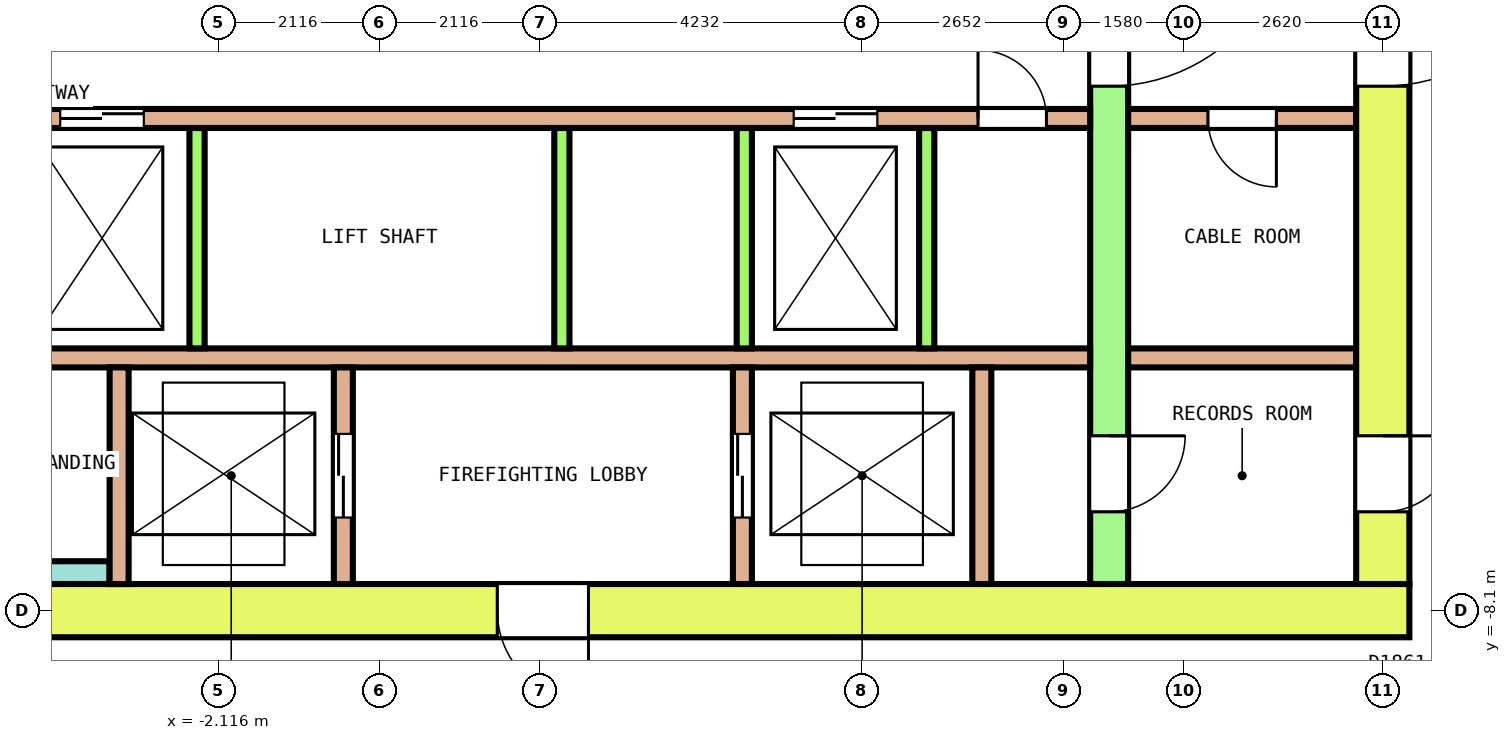
"""IFC4 building model, lengths in metres.
Left out: names, types, materials, properties, quantities, classifications, styles, units other than length and angle.
Written with IfcOpenShell. Run it as: python <this file> out.ifc"""

import sys

from ifc_helpers import new_model, si_unit, direction, frame, frame_2d, origin, place, context, subcontext, project, spatial, rectangle, extrude, element, fill, save


model = new_model("IFC4")
c1 = context("Model", 3, precision=1e-05, world=origin(), true_north=direction((0.0, 1.0)))
c2 = subcontext(c1, "Body", "Model", "MODEL_VIEW")
j1 = project(units=[si_unit("LENGTHUNIT", "METRE"), si_unit("PLANEANGLEUNIT", "RADIAN")], contexts=[c1])
p1 = place(None, origin())
s1 = spatial("IfcSite", under=j1, at=p1, CompositionType="ELEMENT")
p2 = place(p1, origin())
s2 = spatial("IfcBuilding", under=s1, at=p2, CompositionType="ELEMENT")
p3 = place(p2, frame((0.0, 0.0, 180.4)))
s3 = spatial("IfcBuildingStorey", under=s2, at=p3, CompositionType="ELEMENT", Elevation=180.4)
p4 = place(p3, frame((-13.55, -8.1, 0.0), z_axis=(0.0, 0.0, 1.0), x_axis=(1.0, 0.0, 0.0)))
e1 = element("IfcWall", 1, at=p4, inside=s3, PredefinedType="SHEAR", context=c2, shape_type="SweptSolid", body=[
    extrude(rectangle(XDim=27.1, YDim=0.7, at=frame_2d((13.55, 0.0))), origin(), (0.0, 0.0, 1.0), 4.1),
])
p5 = place(p4, frame((15.1, 0.0, 0.0)))
e2 = element("IfcOpeningElement", 2, at=p5, cuts=e1, PredefinedType="OPENING", context=c2, shape_type="SweptSolid", body=[
    extrude(rectangle(XDim=1.2, YDim=2.1, at=frame_2d((0.6, 1.05))), frame((0.0, 0.36, 0.0), z_axis=(0.0, -1.0, 0.0), x_axis=(1.0, 0.0, 0.0)), (0.0, 0.0, 1.0), 0.72),
])
p6 = place(p3, frame((13.2, -7.75, 0.0), z_axis=(0.0, 0.0, 1.0), x_axis=(0.0, 1.0, 0.0)))
e3 = element("IfcWall", 3, at=p6, inside=s3, PredefinedType="SHEAR", context=c2, shape_type="SweptSolid", body=[
    extrude(rectangle(XDim=15.5, YDim=0.7, at=frame_2d((7.75, 0.0))), origin(), (0.0, 0.0, 1.0), 4.1),
])
p7 = place(p6, frame((6.55, 0.0, 0.0)))
e4 = element("IfcOpeningElement", 4, at=p7, cuts=e3, PredefinedType="OPENING", context=c2, shape_type="SweptSolid", body=[
    extrude(rectangle(XDim=2.4, YDim=2.1, at=frame_2d((1.2, 1.05))), frame((0.0, 0.36, 0.0), z_axis=(0.0, -1.0, 0.0), x_axis=(1.0, 0.0, 0.0)), (0.0, 0.0, 1.0), 0.72),
])
p8 = place(p6, frame((13.45, 0.0, 0.0)))
e5 = element("IfcOpeningElement", 5, at=p8, cuts=e3, PredefinedType="OPENING", context=c2, shape_type="SweptSolid", body=[
    extrude(rectangle(XDim=1.2, YDim=2.1, at=frame_2d((0.6, 1.05))), frame((0.0, 0.36, 0.0), z_axis=(0.0, -1.0, 0.0), x_axis=(1.0, 0.0, 0.0)), (0.0, 0.0, 1.0), 0.72),
])
p9 = place(p6, frame((0.95, 0.0, 0.0)))
e6 = element("IfcOpeningElement", 6, at=p9, cuts=e3, PredefinedType="OPENING", context=c2, shape_type="SweptSolid", body=[
    extrude(rectangle(XDim=1.0, YDim=2.1, at=frame_2d((0.5, 1.05))), frame((0.0, 0.36, 0.0), z_axis=(0.0, -1.0, 0.0), x_axis=(1.0, 0.0, 0.0)), (0.0, 0.0, 1.0), 0.72),
])
p10 = place(p3, frame((9.6, -7.75, 0.0), z_axis=(0.0, 0.0, 1.0), x_axis=(0.0, 1.0, 0.0)))
e7 = element("IfcWall", 7, at=p10, inside=s3, PredefinedType="SHEAR", context=c2, shape_type="SweptSolid", body=[
    extrude(rectangle(XDim=15.5, YDim=0.5, at=frame_2d((7.75, 0.0))), origin(), (0.0, 0.0, 1.0), 4.1),
])
p11 = place(p10, frame((6.55, 0.0, 0.0)))
e8 = element("IfcOpeningElement", 8, at=p11, cuts=e7, PredefinedType="OPENING", context=c2, shape_type="SweptSolid", body=[
    extrude(rectangle(XDim=2.4, YDim=2.1, at=frame_2d((1.2, 1.05))), frame((0.0, 0.26, 0.0), z_axis=(0.0, -1.0, 0.0), x_axis=(1.0, 0.0, 0.0)), (0.0, 0.0, 1.0), 0.52),
])
p12 = place(p10, frame((13.45, 0.0, 0.0)))
e9 = element("IfcOpeningElement", 9, at=p12, cuts=e7, PredefinedType="OPENING", context=c2, shape_type="SweptSolid", body=[
    extrude(rectangle(XDim=1.2, YDim=2.1, at=frame_2d((0.6, 1.05))), frame((0.0, 0.26, 0.0), z_axis=(0.0, -1.0, 0.0), x_axis=(1.0, 0.0, 0.0)), (0.0, 0.0, 1.0), 0.52),
])
p13 = place(p10, frame((0.95, 0.0, 0.0)))
e10 = element("IfcOpeningElement", 10, at=p13, cuts=e7, PredefinedType="OPENING", context=c2, shape_type="SweptSolid", body=[
    extrude(rectangle(XDim=1.0, YDim=2.1, at=frame_2d((0.5, 1.05))), frame((0.0, 0.26, 0.0), z_axis=(0.0, -1.0, 0.0), x_axis=(1.0, 0.0, 0.0)), (0.0, 0.0, 1.0), 0.52),
])
p14 = place(p3, frame((-9.35, -1.625, 0.0), z_axis=(0.0, 0.0, 1.0), x_axis=(1.0, 0.0, 0.0)))
e11 = element("IfcWall", 11, at=p14, inside=s3, PredefinedType="SOLIDWALL", context=c2, shape_type="SweptSolid", body=[
    extrude(rectangle(XDim=18.7, YDim=0.25, at=frame_2d((9.35, 0.0))), origin(), (0.0, 0.0, 1.0), 4.1),
])
p15 = place(p14, frame((2.85, 0.0, 0.0)))
e12 = element("IfcOpeningElement", 12, at=p15, cuts=e11, PredefinedType="OPENING", context=c2, shape_type="SweptSolid", body=[
    extrude(rectangle(XDim=1.1, YDim=2.1, at=frame_2d((0.55, 1.05))), frame((0.0, 0.135, 0.0), z_axis=(0.0, -1.0, 0.0), x_axis=(1.0, 0.0, 0.0)), (0.0, 0.0, 1.0), 0.27),
])
p16 = place(p14, frame((5.15, 0.0, 0.0)))
e13 = element("IfcOpeningElement", 13, at=p16, cuts=e11, PredefinedType="OPENING", context=c2, shape_type="SweptSolid", body=[
    extrude(rectangle(XDim=1.1, YDim=2.1, at=frame_2d((0.55, 1.05))), frame((0.0, 0.135, 0.0), z_axis=(0.0, -1.0, 0.0), x_axis=(1.0, 0.0, 0.0)), (0.0, 0.0, 1.0), 0.27),
])
p17 = place(p14, frame((14.8, 0.0, 0.0)))
e14 = element("IfcOpeningElement", 14, at=p17, cuts=e11, PredefinedType="OPENING", context=c2, shape_type="SweptSolid", body=[
    extrude(rectangle(XDim=1.1, YDim=2.1, at=frame_2d((0.55, 1.05))), frame((0.0, 0.135, 0.0), z_axis=(0.0, -1.0, 0.0), x_axis=(1.0, 0.0, 0.0)), (0.0, 0.0, 1.0), 0.27),
])
p18 = place(p14, frame((0.575, 0.0, 0.0)))
e15 = element("IfcOpeningElement", 15, at=p18, cuts=e11, PredefinedType="OPENING", context=c2, shape_type="SweptSolid", body=[
    extrude(rectangle(XDim=0.9, YDim=2.1, at=frame_2d((0.45, 1.05))), frame((0.0, 0.135, 0.0), z_axis=(0.0, -1.0, 0.0), x_axis=(1.0, 0.0, 0.0)), (0.0, 0.0, 1.0), 0.27),
])
p19 = place(p14, frame((17.225, 0.0, 0.0)))
e16 = element("IfcOpeningElement", 16, at=p19, cuts=e11, PredefinedType="OPENING", context=c2, shape_type="SweptSolid", body=[
    extrude(rectangle(XDim=0.9, YDim=2.1, at=frame_2d((0.45, 1.05))), frame((0.0, 0.135, 0.0), z_axis=(0.0, -1.0, 0.0), x_axis=(1.0, 0.0, 0.0)), (0.0, 0.0, 1.0), 0.27),
])
p20 = place(p3, frame((9.85, -1.625, 0.0), z_axis=(0.0, 0.0, 1.0), x_axis=(1.0, 0.0, 0.0)))
e17 = element("IfcWall", 17, at=p20, inside=s3, PredefinedType="SOLIDWALL", context=c2, shape_type="SweptSolid", body=[
    extrude(rectangle(XDim=3.0, YDim=0.25, at=frame_2d((1.5, 0.0))), origin(), (0.0, 0.0, 1.0), 4.1),
])
p21 = place(p20, frame((1.05, 0.0, 0.0)))
e18 = element("IfcOpeningElement", 18, at=p21, cuts=e17, PredefinedType="OPENING", context=c2, shape_type="SweptSolid", body=[
    extrude(rectangle(XDim=0.9, YDim=2.1, at=frame_2d((0.45, 1.05))), frame((0.0, 0.135, 0.0), z_axis=(0.0, -1.0, 0.0), x_axis=(1.0, 0.0, 0.0)), (0.0, 0.0, 1.0), 0.27),
])
p22 = place(p3, frame((-9.35, -4.775, 0.0), z_axis=(0.0, 0.0, 1.0), x_axis=(1.0, 0.0, 0.0)))
e19 = element("IfcWall", 19, at=p22, inside=s3, PredefinedType="SOLIDWALL", context=c2, shape_type="SweptSolid", body=[
    extrude(rectangle(XDim=18.7, YDim=0.25, at=frame_2d((9.35, 0.0))), origin(), (0.0, 0.0, 1.0), 4.1),
])
p23 = place(p3, frame((9.85, -4.775, 0.0), z_axis=(0.0, 0.0, 1.0), x_axis=(1.0, 0.0, 0.0)))
e20 = element("IfcWall", 20, at=p23, inside=s3, PredefinedType="SOLIDWALL", context=c2, shape_type="SweptSolid", body=[
    extrude(rectangle(XDim=3.0, YDim=0.25, at=frame_2d((1.5, 0.0))), origin(), (0.0, 0.0, 1.0), 4.1),
])
for number, where, z_axis, x_axis in (
    (21, (-2.4, -4.65, 0.0), (0.0, 0.0, 1.0), (0.0, 1.0, 0.0)),
    (22, (2.4, -4.65, 0.0), (0.0, 0.0, 1.0), (0.0, 1.0, 0.0)),
    (23, (4.8, -4.65, 0.0), (0.0, 0.0, 1.0), (0.0, 1.0, 0.0)),
    (24, (7.2, -4.65, 0.0), (0.0, 0.0, 1.0), (0.0, 1.0, 0.0)),
):
    element("IfcWall", number, at=place(p3, frame(where, z_axis=z_axis, x_axis=x_axis)), inside=s3, PredefinedType="SOLIDWALL", context=c2, shape_type="SweptSolid", body=[
        extrude(rectangle(XDim=2.9, YDim=0.2, at=frame_2d((1.45, 0.0))), origin(), (0.0, 0.0, 1.0), 4.1),
    ])
p24 = place(p3, frame((-9.35, -7.6, 0.0), z_axis=(0.0, 0.0, 1.0), x_axis=(1.0, 0.0, 0.0)))
e25 = element("IfcWall", 25, at=p24, inside=s3, PredefinedType="SOLIDWALL", context=c2, shape_type="SweptSolid", body=[
    extrude(rectangle(XDim=5.8, YDim=0.3, at=frame_2d((2.9, 0.0))), origin(), (0.0, 0.0, 1.0), 4.1),
])
p25 = place(p3, frame((-3.425, -7.75, 0.0), z_axis=(0.0, 0.0, 1.0), x_axis=(0.0, 1.0, 0.0)))
e26 = element("IfcWall", 26, at=p25, inside=s3, PredefinedType="SOLIDWALL", context=c2, shape_type="SweptSolid", body=[
    extrude(rectangle(XDim=2.85, YDim=0.25, at=frame_2d((1.425, 0.0))), origin(), (0.0, 0.0, 1.0), 4.1),
])
p26 = place(p3, frame((-0.475, -7.75, 0.0), z_axis=(0.0, 0.0, 1.0), x_axis=(0.0, 1.0, 0.0)))
e27 = element("IfcWall", 27, at=p26, inside=s3, PredefinedType="SOLIDWALL", context=c2, shape_type="SweptSolid", body=[
    extrude(rectangle(XDim=2.85, YDim=0.25, at=frame_2d((1.425, 0.0))), origin(), (0.0, 0.0, 1.0), 4.1),
])
p27 = place(p26, frame((0.875, 0.0, 0.0)))
e28 = element("IfcOpeningElement", 28, at=p27, cuts=e27, PredefinedType="OPENING", context=c2, shape_type="SweptSolid", body=[
    extrude(rectangle(XDim=1.1, YDim=2.1, at=frame_2d((0.55, 1.05))), frame((0.0, 0.135, 0.0), z_axis=(0.0, -1.0, 0.0), x_axis=(1.0, 0.0, 0.0)), (0.0, 0.0, 1.0), 0.27),
])
p28 = place(p3, frame((4.775, -7.75, 0.0), z_axis=(0.0, 0.0, 1.0), x_axis=(0.0, 1.0, 0.0)))
e29 = element("IfcWall", 29, at=p28, inside=s3, PredefinedType="SOLIDWALL", context=c2, shape_type="SweptSolid", body=[
    extrude(rectangle(XDim=2.85, YDim=0.25, at=frame_2d((1.425, 0.0))), origin(), (0.0, 0.0, 1.0), 4.1),
])
p29 = place(p28, frame((0.875, 0.0, 0.0)))
e30 = element("IfcOpeningElement", 30, at=p29, cuts=e29, PredefinedType="OPENING", context=c2, shape_type="SweptSolid", body=[
    extrude(rectangle(XDim=1.1, YDim=2.1, at=frame_2d((0.55, 1.05))), frame((0.0, 0.135, 0.0), z_axis=(0.0, -1.0, 0.0), x_axis=(1.0, 0.0, 0.0)), (0.0, 0.0, 1.0), 0.27),
])
p30 = place(p3, frame((7.925, -7.75, 0.0), z_axis=(0.0, 0.0, 1.0), x_axis=(0.0, 1.0, 0.0)))
e31 = element("IfcWall", 31, at=p30, inside=s3, PredefinedType="SOLIDWALL", context=c2, shape_type="SweptSolid", body=[
    extrude(rectangle(XDim=2.85, YDim=0.25, at=frame_2d((1.425, 0.0))), origin(), (0.0, 0.0, 1.0), 4.1),
])
p31 = place(p16, origin())
e32 = element("IfcDoor", 32, at=p31, inside=s3, OperationType="DOUBLE_DOOR_SLIDING", PredefinedType="DOOR", context=c2, shape_type="SweptSolid", body=[
    extrude(rectangle(XDim=1.1, YDim=2.1, at=frame_2d((0.55, 1.05))), frame((0.0, 0.075, 0.0), z_axis=(0.0, -1.0, 0.0), x_axis=(1.0, 0.0, 0.0)), (0.0, 0.0, 1.0), 0.15),
])
fill(e13, e32)
p32 = place(p17, origin())
e33 = element("IfcDoor", 33, at=p32, inside=s3, OperationType="DOUBLE_DOOR_SLIDING", PredefinedType="DOOR", context=c2, shape_type="SweptSolid", body=[
    extrude(rectangle(XDim=1.1, YDim=2.1, at=frame_2d((0.55, 1.05))), frame((0.0, 0.075, 0.0), z_axis=(0.0, -1.0, 0.0), x_axis=(1.0, 0.0, 0.0)), (0.0, 0.0, 1.0), 0.15),
])
fill(e14, e33)
p33 = place(p27, origin())
e34 = element("IfcDoor", 34, at=p33, inside=s3, OperationType="DOUBLE_DOOR_SLIDING", PredefinedType="DOOR", context=c2, shape_type="SweptSolid", body=[
    extrude(rectangle(XDim=1.1, YDim=2.1, at=frame_2d((0.55, 1.05))), frame((0.0, 0.075, 0.0), z_axis=(0.0, -1.0, 0.0), x_axis=(1.0, 0.0, 0.0)), (0.0, 0.0, 1.0), 0.15),
])
fill(e28, e34)
p34 = place(p29, origin())
e35 = element("IfcDoor", 35, at=p34, inside=s3, OperationType="DOUBLE_DOOR_SLIDING", PredefinedType="DOOR", context=c2, shape_type="SweptSolid", body=[
    extrude(rectangle(XDim=1.1, YDim=2.1, at=frame_2d((0.55, 1.05))), frame((0.0, 0.075, 0.0), z_axis=(0.0, -1.0, 0.0), x_axis=(1.0, 0.0, 0.0)), (0.0, 0.0, 1.0), 0.15),
])
fill(e30, e35)
p35 = place(p11, origin())
e36 = element("IfcDoor", 36, at=p35, inside=s3, OperationType="DOUBLE_DOOR_SINGLE_SWING", PredefinedType="DOOR", context=c2, shape_type="SweptSolid", body=[
    extrude(rectangle(XDim=2.4, YDim=2.1, at=frame_2d((1.2, 1.05))), frame((0.0, 0.2, 0.0), z_axis=(0.0, -1.0, 0.0), x_axis=(1.0, 0.0, 0.0)), (0.0, 0.0, 1.0), 0.4),
])
fill(e8, e36)
p36 = place(p7, origin())
e37 = element("IfcDoor", 37, at=p36, inside=s3, OperationType="DOUBLE_DOOR_SINGLE_SWING", PredefinedType="DOOR", context=c2, shape_type="SweptSolid", body=[
    extrude(rectangle(XDim=2.4, YDim=2.1, at=frame_2d((1.2, 1.05))), frame((0.0, 0.3, 0.0), z_axis=(0.0, -1.0, 0.0), x_axis=(1.0, 0.0, 0.0)), (0.0, 0.0, 1.0), 0.6),
])
fill(e4, e37)
p37 = place(p5, origin())
e38 = element("IfcDoor", 38, at=p37, inside=s3, OperationType="SINGLE_SWING_LEFT", PredefinedType="DOOR", context=c2, shape_type="SweptSolid", body=[
    extrude(rectangle(XDim=1.2, YDim=2.1, at=frame_2d((0.6, 1.05))), frame((0.0, 0.3, 0.0), z_axis=(0.0, -1.0, 0.0), x_axis=(1.0, 0.0, 0.0)), (0.0, 0.0, 1.0), 0.6),
])
fill(e2, e38)
p38 = place(p13, origin())
e39 = element("IfcDoor", 39, at=p38, inside=s3, OperationType="SINGLE_SWING_LEFT", PredefinedType="DOOR", context=c2, shape_type="SweptSolid", body=[
    extrude(rectangle(XDim=1.0, YDim=2.1, at=frame_2d((0.5, 1.05))), frame((0.0, 0.2, 0.0), z_axis=(0.0, -1.0, 0.0), x_axis=(1.0, 0.0, 0.0)), (0.0, 0.0, 1.0), 0.4),
])
fill(e10, e39)
p39 = place(p9, origin())
e40 = element("IfcDoor", 40, at=p39, inside=s3, OperationType="SINGLE_SWING_RIGHT", PredefinedType="DOOR", context=c2, shape_type="SweptSolid", body=[
    extrude(rectangle(XDim=1.0, YDim=2.1, at=frame_2d((0.5, 1.05))), frame((0.0, 0.3, 0.0), z_axis=(0.0, -1.0, 0.0), x_axis=(1.0, 0.0, 0.0)), (0.0, 0.0, 1.0), 0.6),
])
fill(e6, e40)
p40 = place(p19, origin())
e41 = element("IfcDoor", 41, at=p40, inside=s3, OperationType="SINGLE_SWING_LEFT", PredefinedType="DOOR", context=c2, shape_type="SweptSolid", body=[
    extrude(rectangle(XDim=0.9, YDim=2.1, at=frame_2d((0.45, 1.05))), frame((0.0, 0.075, 0.0), z_axis=(0.0, -1.0, 0.0), x_axis=(1.0, 0.0, 0.0)), (0.0, 0.0, 1.0), 0.15),
])
fill(e16, e41)
p41 = place(p21, origin())
e42 = element("IfcDoor", 42, at=p41, inside=s3, OperationType="SINGLE_SWING_RIGHT", PredefinedType="DOOR", context=c2, shape_type="SweptSolid", body=[
    extrude(rectangle(XDim=0.9, YDim=2.1, at=frame_2d((0.45, 1.05))), frame((0.0, 0.075, 0.0), z_axis=(0.0, -1.0, 0.0), x_axis=(1.0, 0.0, 0.0)), (0.0, 0.0, 1.0), 0.15),
])
fill(e18, e42)
save(model, sys.argv[1])
